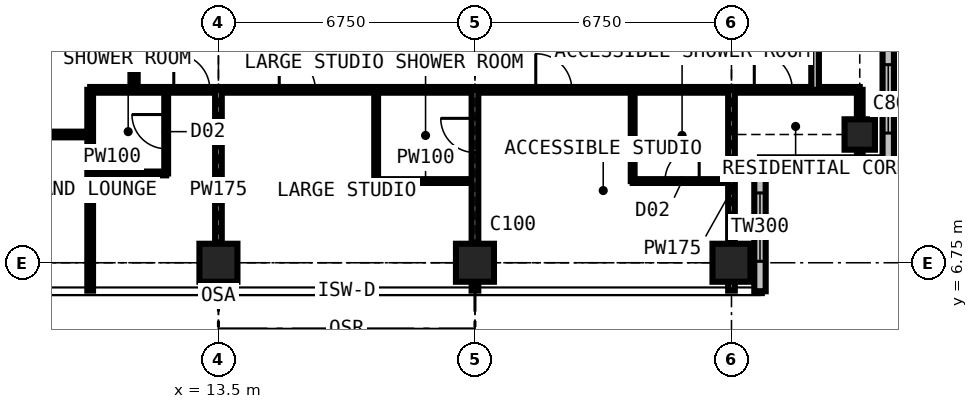
"""IFC4 building model, lengths in metres.
Left out: names, types, materials, properties, quantities, classifications, styles, units other than length and angle.
Written with IfcOpenShell. Run it as: python <this file> out.ifc"""

import sys

from ifc_helpers import new_model, si_unit, direction, frame, frame_2d, origin, origin_2d, place, context, subcontext, project, spatial, rectangle, extrude, element, fill, save


model = new_model("IFC4")
c1 = context("Model", 3, precision=1e-05, world=origin(), true_north=direction((0.0, 1.0)))
c2 = subcontext(c1, "Body", "Model", "MODEL_VIEW")
j1 = project(units=[si_unit("LENGTHUNIT", "METRE"), si_unit("PLANEANGLEUNIT", "RADIAN")], contexts=[c1])
p1 = place(None, origin())
s1 = spatial("IfcSite", under=j1, at=p1, CompositionType="ELEMENT")
p2 = place(p1, origin())
s2 = spatial("IfcBuilding", under=s1, at=p2, CompositionType="ELEMENT")
p3 = place(p2, frame((0.0, 0.0, 229.5)))
s3 = spatial("IfcBuildingStorey", under=s2, at=p3, CompositionType="ELEMENT", Elevation=229.5)
for number, where, z_axis, x_axis in (
    (1, (13.5, 6.75, 0.0), (0.0, 0.0, 1.0), (1.0, 0.0, 0.0)),
    (2, (20.25, 6.75, 0.0), (0.0, 0.0, 1.0), (1.0, 0.0, 0.0)),
    (3, (27.0, 6.75, 0.0), (0.0, 0.0, 1.0), (1.0, 0.0, 0.0)),
):
    element("IfcColumn", number, at=place(p3, frame(where, z_axis=z_axis, x_axis=x_axis)), inside=s3, PredefinedType="COLUMN", context=c2, shape_type="SweptSolid", body=[
        extrude(rectangle(XDim=1.0, YDim=1.0, at=origin_2d()), origin(), (0.0, 0.0, 1.0), 3.6),
    ])
p4 = place(p3, frame((30.375, 10.125, 0.0), z_axis=(0.0, 0.0, 1.0), x_axis=(1.0, 0.0, 0.0)))
e4 = element("IfcColumn", 4, at=p4, inside=s3, PredefinedType="COLUMN", context=c2, shape_type="SweptSolid", body=[
    extrude(rectangle(XDim=0.8, YDim=0.8, at=origin_2d()), origin(), (0.0, 0.0, 1.0), 3.6),
])
p5 = place(p3, frame((27.75, 6.0, 0.0), z_axis=(0.0, 0.0, 1.0), x_axis=(0.0, 1.0, 0.0)))
e5 = element("IfcWall", 5, at=p5, inside=s3, PredefinedType="SOLIDWALL", context=c2, shape_type="SweptSolid", body=[
    extrude(rectangle(XDim=3.375, YDim=0.3, at=frame_2d((1.688, 0.0))), origin(), (0.0, 0.0, 1.0), 3.375),
])
p6 = place(p5, frame((0.788, 0.0, 0.6)))
e6 = element("IfcOpeningElement", 6, at=p6, cuts=e5, PredefinedType="OPENING", context=c2, shape_type="SweptSolid", body=[
    extrude(rectangle(XDim=1.8, YDim=2.1, at=frame_2d((0.9, 1.05))), frame((0.0, 0.16, 0.0), z_axis=(0.0, -1.0, 0.0), x_axis=(1.0, 0.0, 0.0)), (0.0, 0.0, 1.0), 0.32),
])
p7 = place(p3, frame((27.75, 9.375, 0.0), z_axis=(0.0, 0.0, 1.0), x_axis=(1.0, 0.0, 0.0)))
e7 = element("IfcWall", 7, at=p7, inside=s3, PredefinedType="SOLIDWALL", context=c2, shape_type="SweptSolid", body=[
    extrude(rectangle(XDim=3.375, YDim=0.3, at=frame_2d((1.688, 0.0))), origin(), (0.0, 0.0, 1.0), 3.375),
])
p8 = place(p7, frame((0.788, 0.0, 0.6)))
e8 = element("IfcOpeningElement", 8, at=p8, cuts=e7, PredefinedType="OPENING", context=c2, shape_type="SweptSolid", body=[
    extrude(rectangle(XDim=1.8, YDim=2.1, at=frame_2d((0.9, 1.05))), frame((0.0, 0.16, 0.0), z_axis=(0.0, -1.0, 0.0), x_axis=(1.0, 0.0, 0.0)), (0.0, 0.0, 1.0), 0.32),
])
p9 = place(p3, frame((31.125, 9.375, 0.0), z_axis=(0.0, 0.0, 1.0), x_axis=(0.0, 1.0, 0.0)))
e9 = element("IfcWall", 9, at=p9, inside=s3, PredefinedType="SOLIDWALL", context=c2, shape_type="SweptSolid", body=[
    extrude(rectangle(XDim=3.375, YDim=0.3, at=frame_2d((1.688, 0.0))), origin(), (0.0, 0.0, 1.0), 3.375),
])
p10 = place(p9, frame((0.788, 0.0, 0.6)))
e10 = element("IfcOpeningElement", 10, at=p10, cuts=e9, PredefinedType="OPENING", context=c2, shape_type="SweptSolid", body=[
    extrude(rectangle(XDim=1.8, YDim=2.1, at=frame_2d((0.9, 1.05))), frame((0.0, 0.16, 0.0), z_axis=(0.0, -1.0, 0.0), x_axis=(1.0, 0.0, 0.0)), (0.0, 0.0, 1.0), 0.32),
])
p11 = place(p3, frame((2.775, 10.125, 0.0), z_axis=(0.0, 0.0, 1.0), x_axis=(1.0, 0.0, 0.0)))
e11 = element("IfcWall", 11, at=p11, inside=s3, PredefinedType="PARTITIONING", context=c2, shape_type="SweptSolid", body=[
    extrude(rectangle(XDim=7.35, YDim=0.15, at=frame_2d((3.675, 0.0))), origin(), (0.0, 0.0, 1.0), 2.877),
])
p12 = place(p11, frame((1.016, 0.0, 0.0)))
e12 = element("IfcOpeningElement", 12, at=p12, cuts=e11, PredefinedType="OPENING", context=c2, shape_type="SweptSolid", body=[
    extrude(rectangle(XDim=1.0, YDim=2.2, at=frame_2d((0.5, 1.1))), frame((0.0, 0.085, 0.0), z_axis=(0.0, -1.0, 0.0), x_axis=(1.0, 0.0, 0.0)), (0.0, 0.0, 1.0), 0.17),
])
p13 = place(p3, frame((10.125, 6.016, 0.0), z_axis=(0.0, 0.0, 1.0), x_axis=(0.0, 1.0, 0.0)))
e13 = element("IfcWall", 13, at=p13, inside=s3, PredefinedType="PARTITIONING", context=c2, shape_type="SweptSolid", body=[
    extrude(rectangle(XDim=5.284, YDim=0.15, at=frame_2d((2.642, 0.0))), origin(), (0.0, 0.0, 1.0), 3.375),
])
p14 = place(p3, frame((10.125, 9.1, 0.0), z_axis=(0.0, 0.0, 1.0), x_axis=(1.0, 0.0, 0.0)))
e14 = element("IfcWall", 14, at=p14, inside=s3, PredefinedType="PARTITIONING", context=c2, shape_type="SweptSolid", body=[
    extrude(rectangle(XDim=2.0, YDim=0.1, at=frame_2d((1.0, 0.0))), origin(), (0.0, 0.0, 1.0), 3.375),
])
p15 = place(p3, frame((10.125, 11.3, 0.0), z_axis=(0.0, 0.0, 1.0), x_axis=(1.0, 0.0, 0.0)))
e15 = element("IfcWall", 15, at=p15, inside=s3, PredefinedType="PARTITIONING", context=c2, shape_type="SweptSolid", body=[
    extrude(rectangle(XDim=20.25, YDim=0.15, at=frame_2d((10.125, 0.0))), origin(), (0.0, 0.0, 1.0), 3.375),
])
p16 = place(p15, frame((11.725, 0.0, 0.0)))
e16 = element("IfcOpeningElement", 16, at=p16, cuts=e15, PredefinedType="OPENING", context=c2, shape_type="SweptSolid", body=[
    extrude(rectangle(XDim=0.95, YDim=2.2, at=frame_2d((0.475, 1.1))), frame((0.0, 0.085, 0.0), z_axis=(0.0, -1.0, 0.0), x_axis=(1.0, 0.0, 0.0)), (0.0, 0.0, 1.0), 0.17),
])
p17 = place(p15, frame((4.975, 0.0, 0.0)))
e17 = element("IfcOpeningElement", 17, at=p17, cuts=e15, PredefinedType="OPENING", context=c2, shape_type="SweptSolid", body=[
    extrude(rectangle(XDim=0.95, YDim=2.2, at=frame_2d((0.475, 1.1))), frame((0.0, 0.085, 0.0), z_axis=(0.0, -1.0, 0.0), x_axis=(1.0, 0.0, 0.0)), (0.0, 0.0, 1.0), 0.17),
])
p18 = place(p15, frame((2.2, 0.0, 0.0)))
e18 = element("IfcOpeningElement", 18, at=p18, cuts=e15, PredefinedType="OPENING", context=c2, shape_type="SweptSolid", body=[
    extrude(rectangle(XDim=0.95, YDim=2.2, at=frame_2d((0.475, 1.1))), frame((0.0, 0.085, 0.0), z_axis=(0.0, -1.0, 0.0), x_axis=(1.0, 0.0, 0.0)), (0.0, 0.0, 1.0), 0.17),
])
p19 = place(p15, frame((17.475, 0.0, 0.0)))
e19 = element("IfcOpeningElement", 19, at=p19, cuts=e15, PredefinedType="OPENING", context=c2, shape_type="SweptSolid", body=[
    extrude(rectangle(XDim=1.0, YDim=2.2, at=frame_2d((0.5, 1.1))), frame((0.0, 0.085, 0.0), z_axis=(0.0, -1.0, 0.0), x_axis=(1.0, 0.0, 0.0)), (0.0, 0.0, 1.0), 0.17),
])
p20 = place(p3, frame((11.3, 11.3, 0.0), z_axis=(0.0, 0.0, 1.0), x_axis=(0.0, 1.0, 0.0)))
e20 = element("IfcWall", 20, at=p20, inside=s3, PredefinedType="PARTITIONING", context=c2, shape_type="SweptSolid", body=[
    extrude(rectangle(XDim=19.3, YDim=0.15, at=frame_2d((9.65, 0.0))), origin(), (0.0, 0.0, 1.0), 3.375),
])
p21 = place(p20, frame((13.525, 0.0, 0.0)))
e21 = element("IfcOpeningElement", 21, at=p21, cuts=e20, PredefinedType="OPENING", context=c2, shape_type="SweptSolid", body=[
    extrude(rectangle(XDim=1.0, YDim=2.2, at=frame_2d((0.5, 1.1))), frame((0.0, 0.085, 0.0), z_axis=(0.0, -1.0, 0.0), x_axis=(1.0, 0.0, 0.0)), (0.0, 0.0, 1.0), 0.17),
])
p22 = place(p20, frame((10.438, 0.0, 0.0)))
e22 = element("IfcOpeningElement", 22, at=p22, cuts=e20, PredefinedType="OPENING", context=c2, shape_type="SweptSolid", body=[
    extrude(rectangle(XDim=1.0, YDim=2.2, at=frame_2d((0.5, 1.1))), frame((0.0, 0.085, 0.0), z_axis=(0.0, -1.0, 0.0), x_axis=(1.0, 0.0, 0.0)), (0.0, 0.0, 1.0), 0.17),
])
p23 = place(p3, frame((12.125, 9.1, 0.0), z_axis=(0.0, 0.0, 1.0), x_axis=(0.0, 1.0, 0.0)))
e23 = element("IfcWall", 23, at=p23, inside=s3, PredefinedType="PARTITIONING", context=c2, shape_type="SweptSolid", body=[
    extrude(rectangle(XDim=2.2, YDim=0.1, at=frame_2d((1.1, 0.0))), origin(), (0.0, 0.0, 1.0), 3.375),
])
p24 = place(p23, frame((0.65, 0.0, 0.0)))
e24 = element("IfcOpeningElement", 24, at=p24, cuts=e23, PredefinedType="OPENING", context=c2, shape_type="SweptSolid", body=[
    extrude(rectangle(XDim=0.9, YDim=2.2, at=frame_2d((0.45, 1.1))), frame((0.0, 0.06, 0.0), z_axis=(0.0, -1.0, 0.0), x_axis=(1.0, 0.0, 0.0)), (0.0, 0.0, 1.0), 0.12),
])
p25 = place(p3, frame((13.5, 6.016, 0.0), z_axis=(0.0, 0.0, 1.0), x_axis=(0.0, 1.0, 0.0)))
e25 = element("IfcWall", 25, at=p25, inside=s3, PredefinedType="PARTITIONING", context=c2, shape_type="SweptSolid", body=[
    extrude(rectangle(XDim=5.284, YDim=0.175, at=frame_2d((2.642, 0.0))), origin(), (0.0, 0.0, 1.0), 2.61),
])
p26 = place(p3, frame((17.65, 8.9, 0.0), z_axis=(0.0, 0.0, 1.0), x_axis=(0.0, 1.0, 0.0)))
e26 = element("IfcWall", 26, at=p26, inside=s3, PredefinedType="PARTITIONING", context=c2, shape_type="SweptSolid", body=[
    extrude(rectangle(XDim=2.4, YDim=0.1, at=frame_2d((1.2, 0.0))), origin(), (0.0, 0.0, 1.0), 3.375),
])
p27 = place(p3, frame((17.65, 8.9, 0.0), z_axis=(0.0, 0.0, 1.0), x_axis=(1.0, 0.0, 0.0)))
e27 = element("IfcWall", 27, at=p27, inside=s3, PredefinedType="PARTITIONING", context=c2, shape_type="SweptSolid", body=[
    extrude(rectangle(XDim=2.6, YDim=0.1, at=frame_2d((1.3, 0.0))), origin(), (0.0, 0.0, 1.0), 3.375),
])
p28 = place(p3, frame((20.25, 6.016, 0.0), z_axis=(0.0, 0.0, 1.0), x_axis=(0.0, 1.0, 0.0)))
e28 = element("IfcWall", 28, at=p28, inside=s3, PredefinedType="PARTITIONING", context=c2, shape_type="SweptSolid", body=[
    extrude(rectangle(XDim=5.284, YDim=0.175, at=frame_2d((2.642, 0.0))), origin(), (0.0, 0.0, 1.0), 2.61),
])
p29 = place(p28, frame((3.634, 0.0, 0.0)))
e29 = element("IfcOpeningElement", 29, at=p29, cuts=e28, PredefinedType="OPENING", context=c2, shape_type="SweptSolid", body=[
    extrude(rectangle(XDim=0.9, YDim=2.2, at=frame_2d((0.45, 1.1))), frame((0.0, 0.097, 0.0), z_axis=(0.0, -1.0, 0.0), x_axis=(1.0, 0.0, 0.0)), (0.0, 0.0, 1.0), 0.195),
])
p30 = place(p3, frame((24.4, 8.9, 0.0), z_axis=(0.0, 0.0, 1.0), x_axis=(0.0, 1.0, 0.0)))
e30 = element("IfcWall", 30, at=p30, inside=s3, PredefinedType="PARTITIONING", context=c2, shape_type="SweptSolid", body=[
    extrude(rectangle(XDim=2.4, YDim=0.1, at=frame_2d((1.2, 0.0))), origin(), (0.0, 0.0, 1.0), 3.375),
])
p31 = place(p3, frame((24.4, 8.9, 0.0), z_axis=(0.0, 0.0, 1.0), x_axis=(1.0, 0.0, 0.0)))
e31 = element("IfcWall", 31, at=p31, inside=s3, PredefinedType="PARTITIONING", context=c2, shape_type="SweptSolid", body=[
    extrude(rectangle(XDim=2.6, YDim=0.1, at=frame_2d((1.3, 0.0))), origin(), (0.0, 0.0, 1.0), 3.375),
])
p32 = place(p31, frame((0.85, 0.0, 0.0)))
e32 = element("IfcOpeningElement", 32, at=p32, cuts=e31, PredefinedType="OPENING", context=c2, shape_type="SweptSolid", body=[
    extrude(rectangle(XDim=0.9, YDim=2.2, at=frame_2d((0.45, 1.1))), frame((0.0, 0.06, 0.0), z_axis=(0.0, -1.0, 0.0), x_axis=(1.0, 0.0, 0.0)), (0.0, 0.0, 1.0), 0.12),
])
p33 = place(p3, frame((27.0, 6.016, 0.0), z_axis=(0.0, 0.0, 1.0), x_axis=(0.0, 1.0, 0.0)))
e33 = element("IfcWall", 33, at=p33, inside=s3, PredefinedType="PARTITIONING", context=c2, shape_type="SweptSolid", body=[
    extrude(rectangle(XDim=5.284, YDim=0.175, at=frame_2d((2.642, 0.0))), origin(), (0.0, 0.0, 1.0), 2.877),
])
p34 = place(p3, frame((27.0, 9.375, 0.0), z_axis=(0.0, 0.0, 1.0), x_axis=(1.0, 0.0, 0.0)))
e34 = element("IfcWall", 34, at=p34, inside=s3, PredefinedType="PARTITIONING", context=c2, shape_type="SweptSolid", body=[
    extrude(rectangle(XDim=0.734, YDim=0.15, at=frame_2d((0.367, 0.0))), origin(), (0.0, 0.0, 1.0), 3.375),
])
p35 = place(p3, frame((29.2, 11.3, 0.0), z_axis=(0.0, 0.0, 1.0), x_axis=(0.0, 1.0, 0.0)))
e35 = element("IfcWall", 35, at=p35, inside=s3, PredefinedType="PARTITIONING", context=c2, shape_type="SweptSolid", body=[
    extrude(rectangle(XDim=17.9, YDim=0.2, at=frame_2d((8.95, 0.0))), origin(), (0.0, 0.0, 1.0), 3.375),
])
p36 = place(p35, frame((2.3, 0.0, 0.0)))
e36 = element("IfcOpeningElement", 36, at=p36, cuts=e35, PredefinedType="OPENING", context=c2, shape_type="SweptSolid", body=[
    extrude(rectangle(XDim=1.0, YDim=2.2, at=frame_2d((0.5, 1.1))), frame((0.0, 0.11, 0.0), z_axis=(0.0, -1.0, 0.0), x_axis=(1.0, 0.0, 0.0)), (0.0, 0.0, 1.0), 0.22),
])
p37 = place(p35, frame((10.55, 0.0, 0.0)))
e37 = element("IfcOpeningElement", 37, at=p37, cuts=e35, PredefinedType="OPENING", context=c2, shape_type="SweptSolid", body=[
    extrude(rectangle(XDim=0.95, YDim=2.2, at=frame_2d((0.475, 1.1))), frame((0.0, 0.11, 0.0), z_axis=(0.0, -1.0, 0.0), x_axis=(1.0, 0.0, 0.0)), (0.0, 0.0, 1.0), 0.22),
])
p38 = place(p35, frame((5.775, 0.0, 0.0)))
e38 = element("IfcOpeningElement", 38, at=p38, cuts=e35, PredefinedType="OPENING", context=c2, shape_type="SweptSolid", body=[
    extrude(rectangle(XDim=0.95, YDim=2.2, at=frame_2d((0.475, 1.1))), frame((0.0, 0.11, 0.0), z_axis=(0.0, -1.0, 0.0), x_axis=(1.0, 0.0, 0.0)), (0.0, 0.0, 1.0), 0.22),
])
p39 = place(p35, frame((16.3, 0.0, 0.0)))
e39 = element("IfcOpeningElement", 39, at=p39, cuts=e35, PredefinedType="OPENING", context=c2, shape_type="SweptSolid", body=[
    extrude(rectangle(XDim=1.0, YDim=2.2, at=frame_2d((0.5, 1.1))), frame((0.0, 0.11, 0.0), z_axis=(0.0, -1.0, 0.0), x_axis=(1.0, 0.0, 0.0)), (0.0, 0.0, 1.0), 0.22),
])
p40 = place(p3, frame((30.375, 9.525, 0.0), z_axis=(0.0, 0.0, 1.0), x_axis=(0.0, 1.0, 0.0)))
e40 = element("IfcWall", 40, at=p40, inside=s3, PredefinedType="PARTITIONING", context=c2, shape_type="SweptSolid", body=[
    extrude(rectangle(XDim=1.775, YDim=0.15, at=frame_2d((0.888, 0.0))), origin(), (0.0, 0.0, 1.0), 2.877),
])
p41 = place(p6, origin())
e41 = element("IfcWindow", 41, at=p41, inside=s3, PartitioningType="SINGLE_PANEL", PredefinedType="WINDOW", context=c2, shape_type="SweptSolid", body=[
    extrude(rectangle(XDim=1.8, YDim=2.1, at=frame_2d((0.9, 1.05))), frame((0.0, 0.03, 0.0), z_axis=(0.0, -1.0, 0.0), x_axis=(1.0, 0.0, 0.0)), (0.0, 0.0, 1.0), 0.06),
])
fill(e6, e41)
p42 = place(p8, origin())
e42 = element("IfcWindow", 42, at=p42, inside=s3, PartitioningType="SINGLE_PANEL", PredefinedType="WINDOW", context=c2, shape_type="SweptSolid", body=[
    extrude(rectangle(XDim=1.8, YDim=2.1, at=frame_2d((0.9, 1.05))), frame((0.0, 0.03, 0.0), z_axis=(0.0, -1.0, 0.0), x_axis=(1.0, 0.0, 0.0)), (0.0, 0.0, 1.0), 0.06),
])
fill(e8, e42)
p43 = place(p10, origin())
e43 = element("IfcWindow", 43, at=p43, inside=s3, PartitioningType="SINGLE_PANEL", PredefinedType="WINDOW", context=c2, shape_type="SweptSolid", body=[
    extrude(rectangle(XDim=1.8, YDim=2.1, at=frame_2d((0.9, 1.05))), frame((0.0, 0.03, 0.0), z_axis=(0.0, -1.0, 0.0), x_axis=(1.0, 0.0, 0.0)), (0.0, 0.0, 1.0), 0.06),
])
fill(e10, e43)
p44 = place(p16, origin())
e44 = element("IfcDoor", 44, at=p44, inside=s3, OperationType="SINGLE_SWING_LEFT", PredefinedType="DOOR", context=c2, shape_type="SweptSolid", body=[
    extrude(rectangle(XDim=0.95, YDim=2.2, at=frame_2d((0.475, 1.1))), frame((0.0, 0.025, 0.0), z_axis=(0.0, -1.0, 0.0), x_axis=(1.0, 0.0, 0.0)), (0.0, 0.0, 1.0), 0.05),
])
fill(e16, e44)
p45 = place(p32, origin())
e45 = element("IfcDoor", 45, at=p45, inside=s3, OperationType="SINGLE_SWING_RIGHT", PredefinedType="DOOR", context=c2, shape_type="SweptSolid", body=[
    extrude(rectangle(XDim=0.9, YDim=2.2, at=frame_2d((0.45, 1.1))), frame((0.0, 0.025, 0.0), z_axis=(0.0, -1.0, 0.0), x_axis=(1.0, 0.0, 0.0)), (0.0, 0.0, 1.0), 0.05),
])
fill(e32, e45)
p46 = place(p17, origin())
e46 = element("IfcDoor", 46, at=p46, inside=s3, OperationType="SINGLE_SWING_LEFT", PredefinedType="DOOR", context=c2, shape_type="SweptSolid", body=[
    extrude(rectangle(XDim=0.95, YDim=2.2, at=frame_2d((0.475, 1.1))), frame((0.0, 0.025, 0.0), z_axis=(0.0, -1.0, 0.0), x_axis=(1.0, 0.0, 0.0)), (0.0, 0.0, 1.0), 0.05),
])
fill(e17, e46)
p47 = place(p29, origin())
e47 = element("IfcDoor", 47, at=p47, inside=s3, OperationType="SINGLE_SWING_RIGHT", PredefinedType="DOOR", context=c2, shape_type="SweptSolid", body=[
    extrude(rectangle(XDim=0.9, YDim=2.2, at=frame_2d((0.45, 1.1))), frame((0.0, 0.025, 0.0), z_axis=(0.0, -1.0, 0.0), x_axis=(1.0, 0.0, 0.0)), (0.0, 0.0, 1.0), 0.05),
])
fill(e29, e47)
p48 = place(p18, origin())
e48 = element("IfcDoor", 48, at=p48, inside=s3, OperationType="SINGLE_SWING_LEFT", PredefinedType="DOOR", context=c2, shape_type="SweptSolid", body=[
    extrude(rectangle(XDim=0.95, YDim=2.2, at=frame_2d((0.475, 1.1))), frame((0.0, 0.025, 0.0), z_axis=(0.0, -1.0, 0.0), x_axis=(1.0, 0.0, 0.0)), (0.0, 0.0, 1.0), 0.05),
])
fill(e18, e48)
p49 = place(p24, origin())
e49 = element("IfcDoor", 49, at=p49, inside=s3, OperationType="SINGLE_SWING_RIGHT", PredefinedType="DOOR", context=c2, shape_type="SweptSolid", body=[
    extrude(rectangle(XDim=0.9, YDim=2.2, at=frame_2d((0.45, 1.1))), frame((0.0, 0.025, 0.0), z_axis=(0.0, -1.0, 0.0), x_axis=(1.0, 0.0, 0.0)), (0.0, 0.0, 1.0), 0.05),
])
fill(e24, e49)
p50 = place(p19, origin())
e50 = element("IfcDoor", 50, at=p50, inside=s3, OperationType="SINGLE_SWING_LEFT", PredefinedType="DOOR", context=c2, shape_type="SweptSolid", body=[
    extrude(rectangle(XDim=1.0, YDim=2.2, at=frame_2d((0.5, 1.1))), frame((0.0, 0.025, 0.0), z_axis=(0.0, -1.0, 0.0), x_axis=(1.0, 0.0, 0.0)), (0.0, 0.0, 1.0), 0.05),
])
fill(e19, e50)
save(model, sys.argv[1])
